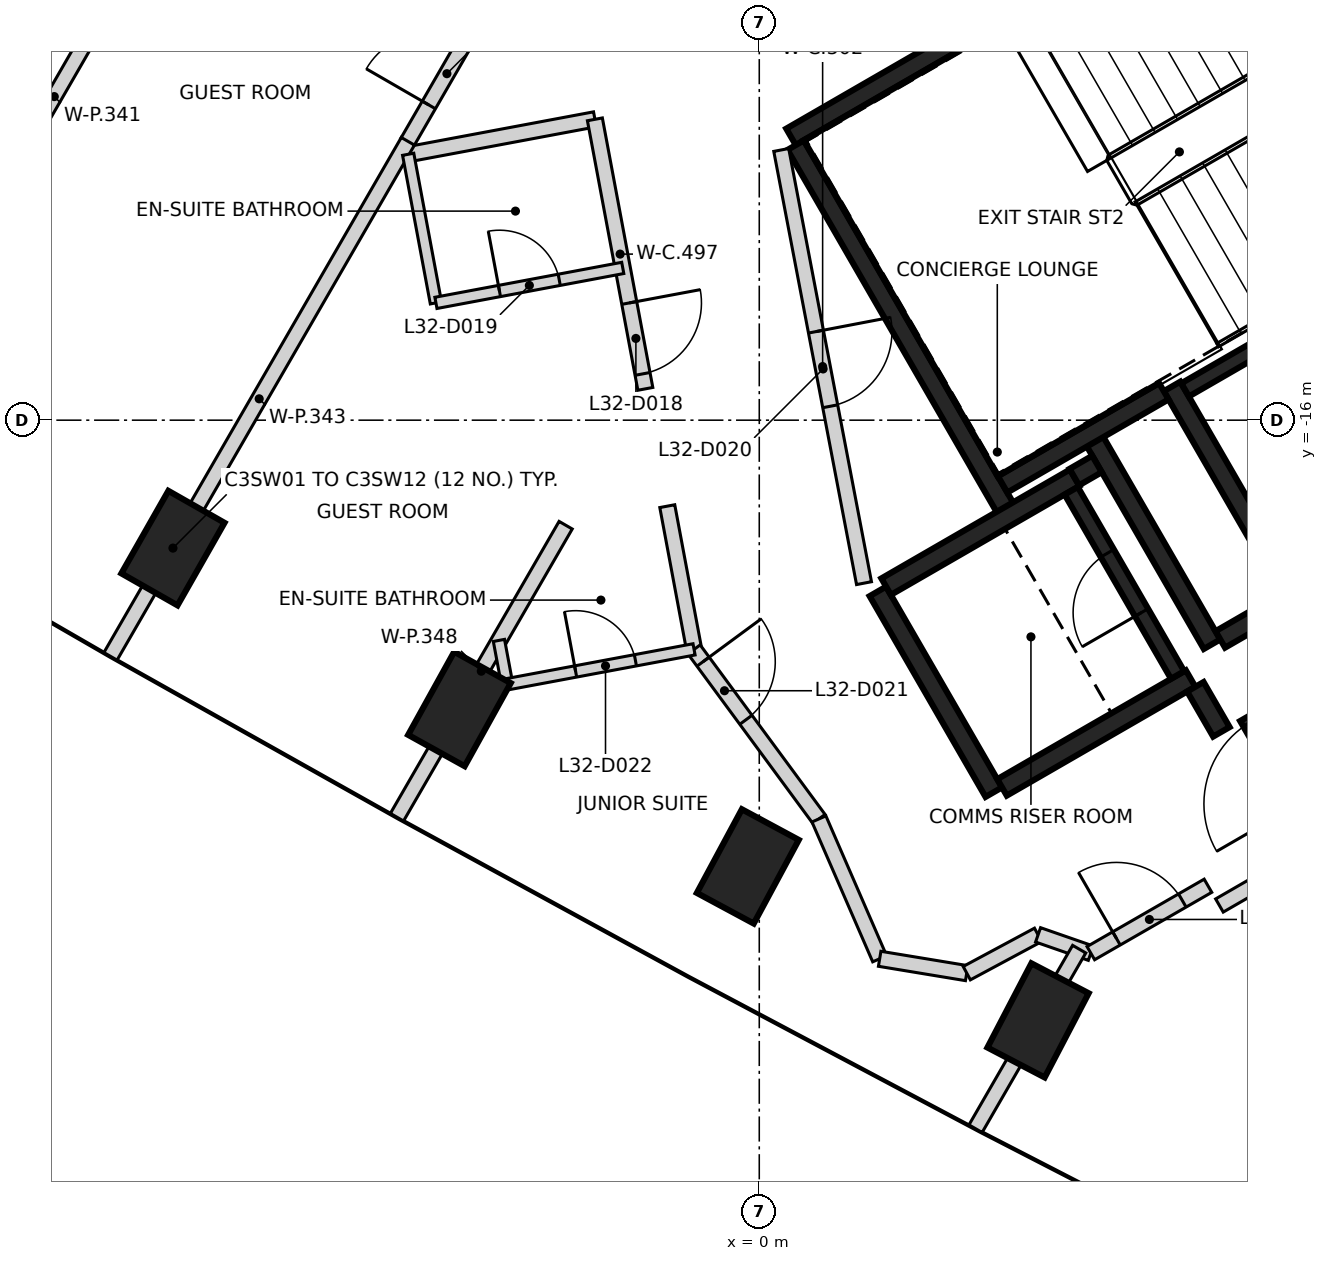
"""IFC4 building model, lengths in metres.
Left out: names, types, materials, properties, quantities, classifications, styles, units other than length and angle.
Written with IfcOpenShell. Run it as: python <this file> out.ifc"""

import sys

from ifc_helpers import new_model, si_unit, direction, frame, frame_2d, origin, origin_2d, place, context, subcontext, project, spatial, rectangle, extrude, element, fill, save


model = new_model("IFC4")
c1 = context("Model", 3, precision=1e-05, world=origin(), true_north=direction((0.0, 1.0)))
c2 = subcontext(c1, "Body", "Model", "MODEL_VIEW")
j1 = project(units=[si_unit("LENGTHUNIT", "METRE"), si_unit("PLANEANGLEUNIT", "RADIAN")], contexts=[c1])
p1 = place(None, origin())
s1 = spatial("IfcSite", under=j1, at=p1, CompositionType="ELEMENT")
p2 = place(p1, origin())
s2 = spatial("IfcBuilding", under=s1, at=p2, CompositionType="ELEMENT")
p3 = place(p2, frame((0.0, 0.0, 132.4)))
s3 = spatial("IfcBuildingStorey", under=s2, at=p3, CompositionType="ELEMENT", Elevation=132.4)
for number, where, z_axis, x_axis in (
    (1, (-7.714, -17.683, -0.4), (0.0, 0.0, 1.0), (0.495, 0.869, 0.0)),
    (2, (-3.945, -19.8, -0.4), (0.0, 0.0, 1.0), (0.485, 0.875, 0.0)),
    (3, (-0.151, -21.871, -0.4), (0.0, 0.0, 1.0), (0.474, 0.881, 0.0)),
    (4, (3.667, -23.896, -0.4), (0.0, 0.0, 1.0), (0.463, 0.886, 0.0)),
):
    element("IfcColumn", number, at=place(p3, frame(where, z_axis=z_axis, x_axis=x_axis)), inside=s3, PredefinedType="COLUMN", context=c2, shape_type="SweptSolid", body=[
        extrude(rectangle(XDim=1.25, YDim=0.85, at=origin_2d()), origin(), (0.0, 0.0, 1.0), 3.6),
    ])
p4 = place(p3, frame((0.417, -12.273, 0.0), z_axis=(0.0, 0.0, 1.0), x_axis=(0.866021906294, 0.500006057782, 0.0)))
e5 = element("IfcWall", 5, at=p4, inside=s3, PredefinedType="SHEAR", context=c2, shape_type="SweptSolid", body=[
    extrude(rectangle(XDim=11.55, YDim=0.25, at=frame_2d((5.775, 0.0))), origin(), (0.0, 0.0, 1.0), 3.2),
])
p5 = place(p4, frame((10.025, 0.0, 0.0)))
e6 = element("IfcOpeningElement", 6, at=p5, cuts=e5, PredefinedType="OPENING", context=c2, shape_type="SweptSolid", body=[
    extrude(rectangle(XDim=1.2, YDim=2.1, at=frame_2d((0.6, 1.05))), frame((0.0, 0.135, 0.0), z_axis=(0.0, -1.0, 0.0), x_axis=(1.0, 0.0, 0.0)), (0.0, 0.0, 1.0), 0.27),
])
p6 = place(p4, frame((8.725, 0.0, 0.0)))
e7 = element("IfcOpeningElement", 7, at=p6, cuts=e5, PredefinedType="OPENING", context=c2, shape_type="SweptSolid", body=[
    extrude(rectangle(XDim=1.2, YDim=2.1, at=frame_2d((0.6, 1.05))), frame((0.0, 0.135, 0.0), z_axis=(0.0, -1.0, 0.0), x_axis=(1.0, 0.0, 0.0)), (0.0, 0.0, 1.0), 0.27),
])
p7 = place(p3, frame((3.235, -17.153, 0.0), z_axis=(0.0, 0.0, 1.0), x_axis=(-0.500008851346, 0.866020293397, 0.0)))
e8 = element("IfcWall", 8, at=p7, inside=s3, PredefinedType="SHEAR", context=c2, shape_type="SweptSolid", body=[
    extrude(rectangle(XDim=5.51, YDim=0.25, at=frame_2d((2.755, 0.0))), origin(), (0.0, 0.0, 1.0), 3.2),
])
p8 = place(p3, frame((7.031, -18.327, 0.0), z_axis=(0.0, 0.0, 1.0), x_axis=(-0.499971222258, 0.866042017984, 0.0)))
e9 = element("IfcWall", 9, at=p8, inside=s3, PredefinedType="SHEAR", context=c2, shape_type="SweptSolid", body=[
    extrude(rectangle(XDim=3.2, YDim=0.25, at=frame_2d((1.6, 0.0))), origin(), (0.0, 0.0, 1.0), 3.2),
])
p9 = place(p3, frame((3.085, -20.894, 0.0), z_axis=(0.0, 0.0, 1.0), x_axis=(-0.499978833458, 0.866037623948, 0.0)))
e10 = element("IfcWall", 10, at=p9, inside=s3, PredefinedType="SHEAR", context=c2, shape_type="SweptSolid", body=[
    extrude(rectangle(XDim=3.05, YDim=0.25, at=frame_2d((1.525, 0.0))), origin(), (0.0, 0.0, 1.0), 3.2),
])
p10 = place(p3, frame((1.669, -18.19, 0.0), z_axis=(0.0, 0.0, 1.0), x_axis=(0.866042235819, 0.499970844928, 0.0)))
e11 = element("IfcWall", 11, at=p10, inside=s3, PredefinedType="SHEAR", context=c2, shape_type="SweptSolid", body=[
    extrude(rectangle(XDim=2.865, YDim=0.25, at=frame_2d((1.432, 0.0))), origin(), (0.0, 0.0, 1.0), 3.2),
])
p11 = place(p3, frame((5.675, -19.399, 0.0), z_axis=(0.0, 0.0, 1.0), x_axis=(-0.866026637627, -0.499997862916, 0.0)))
e12 = element("IfcWall", 12, at=p11, inside=s3, PredefinedType="SHEAR", context=c2, shape_type="SweptSolid", body=[
    extrude(rectangle(XDim=2.865, YDim=0.25, at=frame_2d((1.432, 0.0))), origin(), (0.0, 0.0, 1.0), 3.2),
])
p12 = place(p3, frame((4.414, -16.276, 0.0), z_axis=(0.0, 0.0, 1.0), x_axis=(0.500003324108, -0.866023484601, 0.0)))
e13 = element("IfcWall", 13, at=p12, inside=s3, PredefinedType="SHEAR", context=c2, shape_type="SweptSolid", body=[
    extrude(rectangle(XDim=3.085, YDim=0.25, at=frame_2d((1.542, 0.0))), origin(), (0.0, 0.0, 1.0), 3.2),
])
p13 = place(p3, frame((5.322, -15.619, 0.0), z_axis=(0.0, 0.0, 1.0), x_axis=(-0.866026229868, -0.499998569178, 0.0)))
e14 = element("IfcWall", 14, at=p13, inside=s3, PredefinedType="SHEAR", context=c2, shape_type="SweptSolid", body=[
    extrude(rectangle(XDim=2.449, YDim=0.25, at=frame_2d((1.225, 0.0))), origin(), (0.0, 0.0, 1.0), 3.2),
])
p14 = place(p3, frame((7.367, -21.51, 0.0), z_axis=(0.0, 0.0, 1.0), x_axis=(-0.499983108224, 0.866035156036, 0.0)))
e15 = element("IfcWall", 15, at=p14, inside=s3, PredefinedType="SHEAR", context=c2, shape_type="SweptSolid", body=[
    extrude(rectangle(XDim=1.865, YDim=0.25, at=frame_2d((0.932, 0.0))), origin(), (0.0, 0.0, 1.0), 3.2),
])
p15 = place(p14, frame((0.535, 0.0, 0.0)))
e16 = element("IfcOpeningElement", 16, at=p15, cuts=e15, PredefinedType="OPENING", context=c2, shape_type="SweptSolid", body=[
    extrude(rectangle(XDim=1.25, YDim=2.1, at=frame_2d((0.625, 1.05))), frame((0.0, 0.135, 0.0), z_axis=(0.0, -1.0, 0.0), x_axis=(1.0, 0.0, 0.0)), (0.0, 0.0, 1.0), 0.27),
])
p16 = place(p3, frame((6.065, -18.885, 0.0), z_axis=(0.0, 0.0, 1.0), x_axis=(0.866017078145, 0.500014420154, 0.0)))
e17 = element("IfcWall", 17, at=p16, inside=s3, PredefinedType="SHEAR", context=c2, shape_type="SweptSolid", body=[
    extrude(rectangle(XDim=0.989, YDim=0.25, at=frame_2d((0.495, 0.0))), origin(), (0.0, 0.0, 1.0), 3.2),
])
p17 = place(p3, frame((6.08, -20.1, 0.0), z_axis=(0.0, 0.0, 1.0), x_axis=(-0.500051773299, 0.865995510393, 0.0)))
e18 = element("IfcWall", 18, at=p17, inside=s3, PredefinedType="SHEAR", context=c2, shape_type="SweptSolid", body=[
    extrude(rectangle(XDim=0.685, YDim=0.25, at=frame_2d((0.342, 0.0))), origin(), (0.0, 0.0, 1.0), 3.2),
])
p18 = place(p3, frame((4.145, -16.749, 0.0), z_axis=(0.0, 0.0, 1.0), x_axis=(0.866185586049, 0.49972245349, 0.0)))
e19 = element("IfcWall", 19, at=p18, inside=s3, PredefinedType="SHEAR", context=c2, shape_type="SweptSolid", body=[
    extrude(rectangle(XDim=0.344, YDim=0.25, at=frame_2d((0.172, 0.0))), origin(), (0.0, 0.0, 1.0), 3.2),
])
p19 = place(p3, frame((10.538, -12.752, 0.0), z_axis=(0.0, 0.0, 1.0), x_axis=(-0.866038630372, -0.499977090179, 0.0)))
e20 = element("IfcWall", 20, at=p19, inside=s3, PredefinedType="SHEAR", context=c2, shape_type="SweptSolid", body=[
    extrude(rectangle(XDim=5.699, YDim=0.2, at=frame_2d((2.85, 0.0))), origin(), (0.0, 0.0, 1.0), 3.2),
])
p20 = place(p3, frame((5.503, -19.352, 0.0), z_axis=(0.0, 0.0, 1.0), x_axis=(-0.499986818241, 0.866033014143, 0.0)))
e21 = element("IfcWall", 21, at=p20, inside=s3, PredefinedType="SHEAR", context=c2, shape_type="SweptSolid", body=[
    extrude(rectangle(XDim=2.798, YDim=0.2, at=frame_2d((1.399, 0.0))), origin(), (0.0, 0.0, 1.0), 3.2),
])
p21 = place(p20, frame((0.949, 0.0, 0.0)))
e22 = element("IfcOpeningElement", 22, at=p21, cuts=e21, PredefinedType="OPENING", context=c2, shape_type="SweptSolid", body=[
    extrude(rectangle(XDim=0.9, YDim=2.1, at=frame_2d((0.45, 1.05))), frame((0.0, 0.11, 0.0), z_axis=(0.0, -1.0, 0.0), x_axis=(1.0, 0.0, 0.0)), (0.0, 0.0, 1.0), 0.22),
])
p22 = place(p3, frame((-4.629, -12.341, 0.0), z_axis=(0.0, 0.0, 1.0), x_axis=(0.500069467685, 0.865985292883, 0.0)))
e23 = element("IfcWall", 23, at=p22, inside=s3, PredefinedType="PARTITIONING", context=c2, shape_type="SweptSolid", body=[
    extrude(rectangle(XDim=4.202, YDim=0.2, at=frame_2d((2.101, 0.0))), origin(), (0.0, 0.0, 1.0), 3.2),
])
p23 = place(p22, frame((0.564, 0.0, 0.0)))
e24 = element("IfcOpeningElement", 24, at=p23, cuts=e23, PredefinedType="OPENING", context=c2, shape_type="SweptSolid", body=[
    extrude(rectangle(XDim=0.95, YDim=2.1, at=frame_2d((0.475, 1.05))), frame((0.0, 0.11, 0.0), z_axis=(0.0, -1.0, 0.0), x_axis=(1.0, 0.0, 0.0)), (0.0, 0.0, 1.0), 0.22),
])
p24 = place(p3, frame((-4.6, -12.498, 0.0), z_axis=(0.0, 0.0, 1.0), x_axis=(0.982950102255, 0.183872500602, 0.0)))
e25 = element("IfcWall", 25, at=p24, inside=s3, PredefinedType="PARTITIONING", context=c2, shape_type="SweptSolid", body=[
    extrude(rectangle(XDim=2.48, YDim=0.2, at=frame_2d((1.24, 0.0))), origin(), (0.0, 0.0, 1.0), 3.2),
])
p25 = place(p3, frame((-2.163, -12.042, 0.0), z_axis=(0.0, 0.0, 1.0), x_axis=(0.183945287989, -0.982936483719, 0.0)))
e26 = element("IfcWall", 26, at=p25, inside=s3, PredefinedType="PARTITIONING", context=c2, shape_type="SweptSolid", body=[
    extrude(rectangle(XDim=3.607, YDim=0.2, at=frame_2d((1.804, 0.0))), origin(), (0.0, 0.0, 1.0), 3.2),
])
p26 = place(p25, frame((2.458, 0.0, 0.0)))
e27 = element("IfcOpeningElement", 27, at=p26, cuts=e26, PredefinedType="OPENING", context=c2, shape_type="SweptSolid", body=[
    extrude(rectangle(XDim=0.95, YDim=2.1, at=frame_2d((0.475, 1.05))), frame((0.0, 0.11, 0.0), z_axis=(0.0, -1.0, 0.0), x_axis=(1.0, 0.0, 0.0)), (0.0, 0.0, 1.0), 0.22),
])
p27 = place(p3, frame((-1.21, -17.131, 0.0), z_axis=(0.0, 0.0, 1.0), x_axis=(0.183950101319, -0.982935582948, 0.0)))
e28 = element("IfcWall", 28, at=p27, inside=s3, PredefinedType="PARTITIONING", context=c2, shape_type="SweptSolid", body=[
    extrude(rectangle(XDim=1.917, YDim=0.2, at=frame_2d((0.958, 0.0))), origin(), (0.0, 0.0, 1.0), 3.2),
])
p28 = place(p3, frame((-0.858, -19.016, 0.0), z_axis=(0.0, 0.0, 1.0), x_axis=(0.593123867414, -0.805111220829, 0.0)))
e29 = element("IfcWall", 29, at=p28, inside=s3, PredefinedType="PARTITIONING", context=c2, shape_type="SweptSolid", body=[
    extrude(rectangle(XDim=2.77, YDim=0.2, at=frame_2d((1.385, 0.0))), origin(), (0.0, 0.0, 1.0), 3.2),
])
p29 = place(p28, frame((0.2, 0.0, 0.0)))
e30 = element("IfcOpeningElement", 30, at=p29, cuts=e29, PredefinedType="OPENING", context=c2, shape_type="SweptSolid", body=[
    extrude(rectangle(XDim=0.95, YDim=2.1, at=frame_2d((0.475, 1.05))), frame((0.0, 0.11, 0.0), z_axis=(0.0, -1.0, 0.0), x_axis=(1.0, 0.0, 0.0)), (0.0, 0.0, 1.0), 0.22),
])
p30 = place(p3, frame((0.289, -12.445, 0.0), z_axis=(0.0, 0.0, 1.0), x_axis=(0.187668946952, -0.982232338273, 0.0)))
e31 = element("IfcWall", 31, at=p30, inside=s3, PredefinedType="PARTITIONING", context=c2, shape_type="SweptSolid", body=[
    extrude(rectangle(XDim=5.802, YDim=0.2, at=frame_2d((2.901, 0.0))), origin(), (0.0, 0.0, 1.0), 3.2),
])
p31 = place(p30, frame((2.433, 0.0, 0.0)))
e32 = element("IfcOpeningElement", 32, at=p31, cuts=e31, PredefinedType="OPENING", context=c2, shape_type="SweptSolid", body=[
    extrude(rectangle(XDim=1.0, YDim=2.1, at=frame_2d((0.5, 1.05))), frame((0.0, 0.11, 0.0), z_axis=(0.0, -1.0, 0.0), x_axis=(1.0, 0.0, 0.0)), (0.0, 0.0, 1.0), 0.22),
])
p32 = place(p3, frame((0.785, -21.246, 0.0), z_axis=(0.0, 0.0, 1.0), x_axis=(0.398365586627, -0.917226721913, 0.0)))
e33 = element("IfcWall", 33, at=p32, inside=s3, PredefinedType="PARTITIONING", context=c2, shape_type="SweptSolid", body=[
    extrude(rectangle(XDim=2.006, YDim=0.2, at=frame_2d((1.003, 0.0))), origin(), (0.0, 0.0, 1.0), 2.3),
])
p33 = place(p3, frame((1.584, -23.086, 0.0), z_axis=(0.0, 0.0, 1.0), x_axis=(0.986654221629, -0.162829502674, 0.0)))
e34 = element("IfcWall", 34, at=p33, inside=s3, PredefinedType="PARTITIONING", context=c2, shape_type="SweptSolid", body=[
    extrude(rectangle(XDim=1.16, YDim=0.2, at=frame_2d((0.58, 0.0))), origin(), (0.0, 0.0, 1.0), 2.3),
])
p34 = place(p3, frame((2.73, -23.275, 0.0), z_axis=(0.0, 0.0, 1.0), x_axis=(0.880927165636, 0.473251866182, 0.0)))
e35 = element("IfcWall", 35, at=p34, inside=s3, PredefinedType="PARTITIONING", context=c2, shape_type="SweptSolid", body=[
    extrude(rectangle(XDim=1.065, YDim=0.2, at=frame_2d((0.532, 0.0))), origin(), (0.0, 0.0, 1.0), 3.2),
])
p35 = place(p3, frame((3.668, -22.771, 0.0), z_axis=(0.0, 0.0, 1.0), x_axis=(0.944447470761, -0.328662402738, 0.0)))
e36 = element("IfcWall", 36, at=p35, inside=s3, PredefinedType="PARTITIONING", context=c2, shape_type="SweptSolid", body=[
    extrude(rectangle(XDim=0.735, YDim=0.2, at=frame_2d((0.367, 0.0))), origin(), (0.0, 0.0, 1.0), 3.2),
])
p36 = place(p3, frame((4.362, -23.012, 0.0), z_axis=(0.0, 0.0, 1.0), x_axis=(0.866692617793, 0.49884256661, 0.0)))
e37 = element("IfcWall", 37, at=p36, inside=s3, PredefinedType="PARTITIONING", context=c2, shape_type="SweptSolid", body=[
    extrude(rectangle(XDim=1.778, YDim=0.2, at=frame_2d((0.889, 0.0))), origin(), (0.0, 0.0, 1.0), 3.2),
])
p37 = place(p36, frame((0.389, 0.0, 0.0)))
e38 = element("IfcOpeningElement", 38, at=p37, cuts=e37, PredefinedType="OPENING", context=c2, shape_type="SweptSolid", body=[
    extrude(rectangle(XDim=1.0, YDim=2.1, at=frame_2d((0.5, 1.05))), frame((0.0, 0.11, 0.0), z_axis=(0.0, -1.0, 0.0), x_axis=(1.0, 0.0, 0.0)), (0.0, 0.0, 1.0), 0.22),
])
p38 = place(p3, frame((6.054, -22.385, 0.0), z_axis=(0.0, 0.0, 1.0), x_axis=(0.86593101922, 0.500163443238, 0.0)))
e39 = element("IfcWall", 39, at=p38, inside=s3, PredefinedType="PARTITIONING", context=c2, shape_type="SweptSolid", body=[
    extrude(rectangle(XDim=1.39, YDim=0.2, at=frame_2d((0.695, 0.0))), origin(), (0.0, 0.0, 1.0), 3.2),
])
p39 = place(p3, frame((-12.278, -16.946, 0.0), z_axis=(0.0, 0.0, 1.0), x_axis=(0.499887212932, 0.866090511637, 0.0)))
e40 = element("IfcWall", 40, at=p39, inside=s3, PredefinedType="PARTITIONING", context=c2, shape_type="SweptSolid", body=[
    extrude(rectangle(XDim=12.015, YDim=0.2, at=frame_2d((6.007, 0.0))), origin(), (0.0, 0.0, 1.0), 3.2),
])
p40 = place(p3, frame((-8.535, -19.107, 0.0), z_axis=(0.0, 0.0, 1.0), x_axis=(0.500028565219, 0.866008911019, 0.0)))
e41 = element("IfcWall", 41, at=p40, inside=s3, PredefinedType="PARTITIONING", context=c2, shape_type="SweptSolid", body=[
    extrude(rectangle(XDim=7.824, YDim=0.2, at=frame_2d((3.912, 0.0))), origin(), (0.0, 0.0, 1.0), 3.2),
])
p41 = place(p3, frame((-4.767, -21.223, 0.0), z_axis=(0.0, 0.0, 1.0), x_axis=(0.500305100915, 0.865849182017, 0.0)))
e42 = element("IfcWall", 42, at=p41, inside=s3, PredefinedType="PARTITIONING", context=c2, shape_type="SweptSolid", body=[
    extrude(rectangle(XDim=4.437, YDim=0.2, at=frame_2d((2.218, 0.0))), origin(), (0.0, 0.0, 1.0), 3.2),
])
p42 = place(p3, frame((2.845, -25.321, 0.0), z_axis=(0.0, 0.0, 1.0), x_axis=(0.499942002849, 0.866058885866, 0.0)))
e43 = element("IfcWall", 43, at=p42, inside=s3, PredefinedType="PARTITIONING", context=c2, shape_type="SweptSolid", body=[
    extrude(rectangle(XDim=2.727, YDim=0.2, at=frame_2d((1.364, 0.0))), origin(), (0.0, 0.0, 1.0), 3.2),
])
p43 = place(p3, frame((-4.619, -12.502, 0.0), z_axis=(0.0, 0.0, 1.0), x_axis=(0.183517674038, -0.983016410502, 0.0)))
e44 = element("IfcWall", 44, at=p43, inside=s3, PredefinedType="PARTITIONING", context=c2, shape_type="SweptSolid", body=[
    extrude(rectangle(XDim=1.989, YDim=0.15, at=frame_2d((0.994, 0.0))), origin(), (0.0, 0.0, 1.0), 3.2),
])
p44 = place(p3, frame((-4.254, -14.457, 0.0), z_axis=(0.0, 0.0, 1.0), x_axis=(0.98293843799, 0.183934844773, 0.0)))
e45 = element("IfcWall", 45, at=p44, inside=s3, PredefinedType="PARTITIONING", context=c2, shape_type="SweptSolid", body=[
    extrude(rectangle(XDim=2.501, YDim=0.15, at=frame_2d((1.25, 0.0))), origin(), (0.0, 0.0, 1.0), 3.2),
])
p45 = place(p44, frame((0.85, 0.0, 0.0)))
e46 = element("IfcOpeningElement", 46, at=p45, cuts=e45, PredefinedType="OPENING", context=c2, shape_type="SweptSolid", body=[
    extrude(rectangle(XDim=0.8, YDim=2.1, at=frame_2d((0.4, 1.05))), frame((0.0, 0.085, 0.0), z_axis=(0.0, -1.0, 0.0), x_axis=(1.0, 0.0, 0.0)), (0.0, 0.0, 1.0), 0.17),
])
p46 = place(p3, frame((-3.425, -18.897, 0.0), z_axis=(0.0, 0.0, 1.0), x_axis=(0.183861553242, -0.982952150025, 0.0)))
e47 = element("IfcWall", 47, at=p46, inside=s3, PredefinedType="PARTITIONING", context=c2, shape_type="SweptSolid", body=[
    extrude(rectangle(XDim=0.587, YDim=0.15, at=frame_2d((0.293, 0.0))), origin(), (0.0, 0.0, 1.0), 3.2),
])
p47 = place(p3, frame((-3.315, -19.474, 0.0), z_axis=(0.0, 0.0, 1.0), x_axis=(0.982978173855, 0.183722371326, 0.0)))
e48 = element("IfcWall", 48, at=p47, inside=s3, PredefinedType="PARTITIONING", context=c2, shape_type="SweptSolid", body=[
    extrude(rectangle(XDim=2.5, YDim=0.15, at=frame_2d((1.25, 0.0))), origin(), (0.0, 0.0, 1.0), 3.2),
])
p48 = place(p47, frame((0.915, 0.0, 0.0)))
e49 = element("IfcOpeningElement", 49, at=p48, cuts=e48, PredefinedType="OPENING", context=c2, shape_type="SweptSolid", body=[
    extrude(rectangle(XDim=0.8, YDim=2.1, at=frame_2d((0.4, 1.05))), frame((0.0, 0.085, 0.0), z_axis=(0.0, -1.0, 0.0), x_axis=(1.0, 0.0, 0.0)), (0.0, 0.0, 1.0), 0.17),
])
p49 = place(p21, origin())
e50 = element("IfcDoor", 50, at=p49, inside=s3, OperationType="SINGLE_SWING_RIGHT", PredefinedType="DOOR", context=c2, shape_type="SweptSolid", body=[
    extrude(rectangle(XDim=0.9, YDim=2.1, at=frame_2d((0.45, 1.05))), frame((0.0, 0.025, 0.0), z_axis=(0.0, -1.0, 0.0), x_axis=(1.0, 0.0, 0.0)), (0.0, 0.0, 1.0), 0.05),
])
fill(e22, e50)
p50 = place(p23, origin())
e51 = element("IfcDoor", 51, at=p50, inside=s3, OperationType="SINGLE_SWING_LEFT", PredefinedType="DOOR", context=c2, shape_type="SweptSolid", body=[
    extrude(rectangle(XDim=0.95, YDim=2.1, at=frame_2d((0.475, 1.05))), frame((0.0, 0.025, 0.0), z_axis=(0.0, -1.0, 0.0), x_axis=(1.0, 0.0, 0.0)), (0.0, 0.0, 1.0), 0.05),
])
fill(e24, e51)
p51 = place(p26, frame((0.95, 0.0, 0.0), z_axis=(0.0, 0.0, 1.0), x_axis=(-1.0, 0.0, 0.0)))
e52 = element("IfcDoor", 52, at=p51, inside=s3, OperationType="SINGLE_SWING_LEFT", PredefinedType="DOOR", context=c2, shape_type="SweptSolid", body=[
    extrude(rectangle(XDim=0.95, YDim=2.1, at=frame_2d((0.475, 1.05))), frame((0.0, 0.025, 0.0), z_axis=(0.0, -1.0, 0.0), x_axis=(1.0, 0.0, 0.0)), (0.0, 0.0, 1.0), 0.05),
])
fill(e27, e52)
p52 = place(p45, frame((0.8, 0.0, 0.0), z_axis=(0.0, 0.0, 1.0), x_axis=(-1.0, 0.0, 0.0)))
e53 = element("IfcDoor", 53, at=p52, inside=s3, OperationType="SINGLE_SWING_LEFT", PredefinedType="DOOR", context=c2, shape_type="SweptSolid", body=[
    extrude(rectangle(XDim=0.8, YDim=2.1, at=frame_2d((0.4, 1.05))), frame((0.0, 0.025, 0.0), z_axis=(0.0, -1.0, 0.0), x_axis=(1.0, 0.0, 0.0)), (0.0, 0.0, 1.0), 0.05),
])
fill(e46, e53)
p53 = place(p31, origin())
e54 = element("IfcDoor", 54, at=p53, inside=s3, OperationType="SINGLE_SWING_LEFT", PredefinedType="DOOR", context=c2, shape_type="SweptSolid", body=[
    extrude(rectangle(XDim=1.0, YDim=2.1, at=frame_2d((0.5, 1.05))), frame((0.0, 0.025, 0.0), z_axis=(0.0, -1.0, 0.0), x_axis=(1.0, 0.0, 0.0)), (0.0, 0.0, 1.0), 0.05),
])
fill(e32, e54)
p54 = place(p29, frame((0.95, 0.0, 0.0), z_axis=(0.0, 0.0, 1.0), x_axis=(-1.0, 0.0, 0.0)))
e55 = element("IfcDoor", 55, at=p54, inside=s3, OperationType="SINGLE_SWING_LEFT", PredefinedType="DOOR", context=c2, shape_type="SweptSolid", body=[
    extrude(rectangle(XDim=0.95, YDim=2.1, at=frame_2d((0.475, 1.05))), frame((0.0, 0.025, 0.0), z_axis=(0.0, -1.0, 0.0), x_axis=(1.0, 0.0, 0.0)), (0.0, 0.0, 1.0), 0.05),
])
fill(e30, e55)
p55 = place(p48, frame((0.8, 0.0, 0.0), z_axis=(0.0, 0.0, 1.0), x_axis=(-1.0, 0.0, 0.0)))
e56 = element("IfcDoor", 56, at=p55, inside=s3, OperationType="SINGLE_SWING_LEFT", PredefinedType="DOOR", context=c2, shape_type="SweptSolid", body=[
    extrude(rectangle(XDim=0.8, YDim=2.1, at=frame_2d((0.4, 1.05))), frame((0.0, 0.025, 0.0), z_axis=(0.0, -1.0, 0.0), x_axis=(1.0, 0.0, 0.0)), (0.0, 0.0, 1.0), 0.05),
])
fill(e49, e56)
p56 = place(p37, frame((1.0, 0.0, 0.0), z_axis=(0.0, 0.0, 1.0), x_axis=(-1.0, 0.0, 0.0)))
e57 = element("IfcDoor", 57, at=p56, inside=s3, OperationType="SINGLE_SWING_LEFT", PredefinedType="DOOR", context=c2, shape_type="SweptSolid", body=[
    extrude(rectangle(XDim=1.0, YDim=2.1, at=frame_2d((0.5, 1.05))), frame((0.0, 0.025, 0.0), z_axis=(0.0, -1.0, 0.0), x_axis=(1.0, 0.0, 0.0)), (0.0, 0.0, 1.0), 0.05),
])
fill(e38, e57)
save(model, sys.argv[1])
